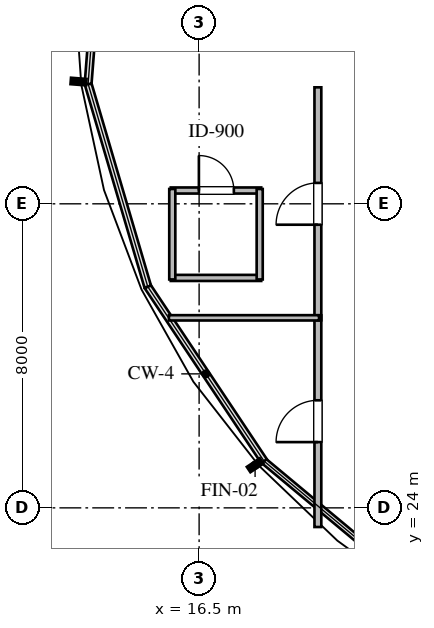
"""IFC4 building model, lengths in metres.
Left out: names, types, materials, properties, quantities, classifications, styles, units other than length and angle.
Written with IfcOpenShell. Run it as: python <this file> out.ifc"""

import sys

from ifc_helpers import new_model, si_unit, direction, frame, frame_2d, origin, place, context, subcontext, project, spatial, rectangle, extrude, element, fill, save


model = new_model("IFC4")
c1 = context("Model", 3, precision=1e-05, world=origin(), true_north=direction((0.0, 1.0)))
c2 = subcontext(c1, "Body", "Model", "MODEL_VIEW")
j1 = project(units=[si_unit("LENGTHUNIT", "METRE"), si_unit("PLANEANGLEUNIT", "RADIAN")], contexts=[c1])
p1 = place(None, origin())
s1 = spatial("IfcSite", under=j1, at=p1, CompositionType="ELEMENT")
p2 = place(p1, origin())
s2 = spatial("IfcBuilding", under=s1, at=p2, CompositionType="ELEMENT")
p3 = place(p2, frame((0.0, 0.0, 187.2)))
s3 = spatial("IfcBuildingStorey", under=s2, at=p3, CompositionType="ELEMENT", Elevation=187.2)
p4 = place(p3, frame((15.754, 30.05, 0.0), z_axis=(0.0, 0.0, 1.0), x_axis=(1.0, 0.0, 0.0)))
e1 = element("IfcWall", 1, at=p4, inside=s3, PredefinedType="PLUMBINGWALL", context=c2, shape_type="SweptSolid", body=[
    extrude(rectangle(XDim=2.38, YDim=0.16, at=frame_2d((1.19, 0.0))), origin(), (0.0, 0.0, 1.0), 3.28),
])
p5 = place(p3, frame((15.754, 32.35, 0.0), z_axis=(0.0, 0.0, 1.0), x_axis=(1.0, 0.0, 0.0)))
e2 = element("IfcWall", 2, at=p5, inside=s3, PredefinedType="PLUMBINGWALL", context=c2, shape_type="SweptSolid", body=[
    extrude(rectangle(XDim=2.38, YDim=0.16, at=frame_2d((1.19, 0.0))), origin(), (0.0, 0.0, 1.0), 3.28),
])
p6 = place(p5, frame((0.74, 0.0, 0.0)))
e3 = element("IfcOpeningElement", 3, at=p6, cuts=e2, PredefinedType="OPENING", context=c2, shape_type="SweptSolid", body=[
    extrude(rectangle(XDim=0.92, YDim=2.1, at=frame_2d((0.46, 1.05))), frame((0.0, 0.09, 0.0), z_axis=(0.0, -1.0, 0.0), x_axis=(1.0, 0.0, 0.0)), (0.0, 0.0, 1.0), 0.18),
])
p7 = place(p3, frame((15.794, 30.01, 0.0), z_axis=(0.0, 0.0, 1.0), x_axis=(0.0, 1.0, 0.0)))
e4 = element("IfcWall", 4, at=p7, inside=s3, PredefinedType="PLUMBINGWALL", context=c2, shape_type="SweptSolid", body=[
    extrude(rectangle(XDim=2.38, YDim=0.16, at=frame_2d((1.19, 0.0))), origin(), (0.0, 0.0, 1.0), 3.28),
])
p8 = place(p3, frame((18.094, 30.01, 0.0), z_axis=(0.0, 0.0, 1.0), x_axis=(0.0, 1.0, 0.0)))
e5 = element("IfcWall", 5, at=p8, inside=s3, PredefinedType="PLUMBINGWALL", context=c2, shape_type="SweptSolid", body=[
    extrude(rectangle(XDim=2.38, YDim=0.16, at=frame_2d((1.19, 0.0))), origin(), (0.0, 0.0, 1.0), 2.737),
])
p9 = place(p3, frame((19.625, 23.496, 0.0), z_axis=(0.0, 0.0, 1.0), x_axis=(0.0, 1.0, 0.0)))
e6 = element("IfcWall", 6, at=p9, inside=s3, PredefinedType="PARTITIONING", context=c2, shape_type="SweptSolid", body=[
    extrude(rectangle(XDim=5.569, YDim=0.18, at=frame_2d((2.784, 0.0))), origin(), (0.0, 0.0, 1.0), 2.737),
])
p10 = place(p9, frame((2.234, 0.0, 0.0)))
e7 = element("IfcOpeningElement", 7, at=p10, cuts=e6, PredefinedType="OPENING", context=c2, shape_type="SweptSolid", body=[
    extrude(rectangle(XDim=1.1, YDim=2.1, at=frame_2d((0.55, 1.05))), frame((0.0, 0.1, 0.0), z_axis=(0.0, -1.0, 0.0), x_axis=(1.0, 0.0, 0.0)), (0.0, 0.0, 1.0), 0.2),
])
p11 = place(p3, frame((19.625, 28.935, 0.0), z_axis=(0.0, 0.0, 1.0), x_axis=(0.0, 1.0, 0.0)))
e8 = element("IfcWall", 8, at=p11, inside=s3, PredefinedType="PARTITIONING", context=c2, shape_type="SweptSolid", body=[
    extrude(rectangle(XDim=6.13, YDim=0.18, at=frame_2d((3.065, 0.0))), origin(), (0.0, 0.0, 1.0), 3.28),
])
p12 = place(p11, frame((2.515, 0.0, 0.0)))
e9 = element("IfcOpeningElement", 9, at=p12, cuts=e8, PredefinedType="OPENING", context=c2, shape_type="SweptSolid", body=[
    extrude(rectangle(XDim=1.1, YDim=2.1, at=frame_2d((0.55, 1.05))), frame((0.0, 0.1, 0.0), z_axis=(0.0, -1.0, 0.0), x_axis=(1.0, 0.0, 0.0)), (0.0, 0.0, 1.0), 0.2),
])
p13 = place(p3, frame((15.705, 29.0, 0.0), z_axis=(0.0, 0.0, 1.0), x_axis=(1.0, 0.0, 0.0)))
e10 = element("IfcWall", 10, at=p13, inside=s3, PredefinedType="PARTITIONING", context=c2, shape_type="SweptSolid", body=[
    extrude(rectangle(XDim=3.95, YDim=0.14, at=frame_2d((1.975, 0.0))), origin(), (0.0, 0.0, 1.0), 3.28),
])
p14 = place(p6, origin())
e11 = element("IfcDoor", 11, at=p14, inside=s3, OperationType="SINGLE_SWING_LEFT", PredefinedType="DOOR", context=c2, shape_type="SweptSolid", body=[
    extrude(rectangle(XDim=0.92, YDim=2.1, at=frame_2d((0.46, 1.05))), frame((0.0, 0.025, 0.0), z_axis=(0.0, -1.0, 0.0), x_axis=(1.0, 0.0, 0.0)), (0.0, 0.0, 1.0), 0.05),
])
fill(e3, e11)
p15 = place(p10, origin())
e12 = element("IfcDoor", 12, at=p15, inside=s3, OperationType="SINGLE_SWING_LEFT", PredefinedType="DOOR", context=c2, shape_type="SweptSolid", body=[
    extrude(rectangle(XDim=1.1, YDim=2.1, at=frame_2d((0.55, 1.05))), frame((0.0, 0.025, 0.0), z_axis=(0.0, -1.0, 0.0), x_axis=(1.0, 0.0, 0.0)), (0.0, 0.0, 1.0), 0.05),
])
fill(e7, e12)
p16 = place(p12, origin())
e13 = element("IfcDoor", 13, at=p16, inside=s3, OperationType="SINGLE_SWING_LEFT", PredefinedType="DOOR", context=c2, shape_type="SweptSolid", body=[
    extrude(rectangle(XDim=1.1, YDim=2.1, at=frame_2d((0.55, 1.05))), frame((0.0, 0.025, 0.0), z_axis=(0.0, -1.0, 0.0), x_axis=(1.0, 0.0, 0.0)), (0.0, 0.0, 1.0), 0.05),
])
fill(e9, e13)
save(model, sys.argv[1])
